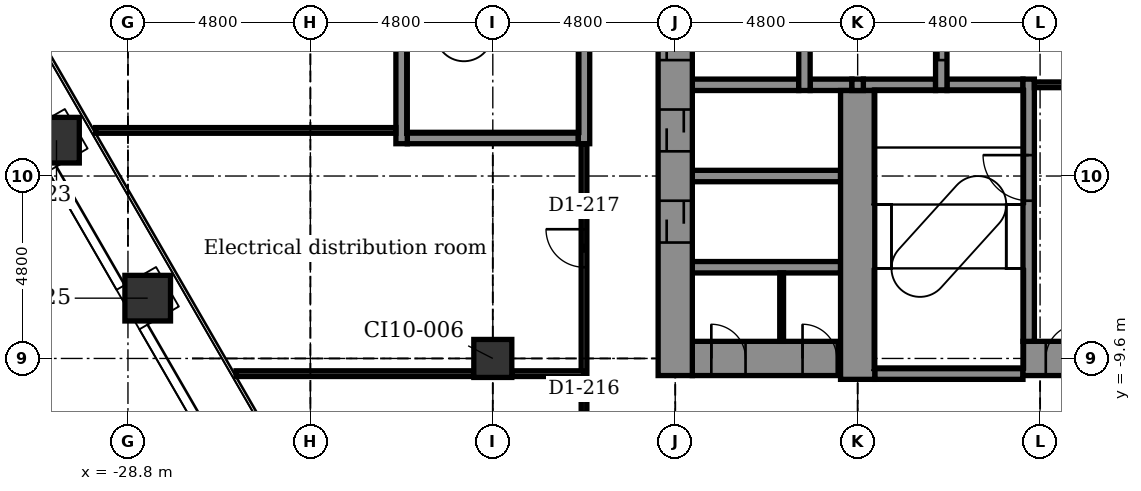
"""IFC4 building model, lengths in metres.
Left out: names, types, materials, properties, quantities, classifications, styles, units other than length and angle.
Written with IfcOpenShell. Run it as: python <this file> out.ifc"""

import sys

from ifc_helpers import new_model, si_unit, direction, frame, frame_2d, origin, origin_2d, place, context, subcontext, project, spatial, rectangle, extrude, element, fill, save


model = new_model("IFC4")
c1 = context("Model", 3, precision=1e-05, world=origin(), true_north=direction((0.0, 1.0)))
c2 = subcontext(c1, "Body", "Model", "MODEL_VIEW")
j1 = project(units=[si_unit("LENGTHUNIT", "METRE"), si_unit("PLANEANGLEUNIT", "RADIAN")], contexts=[c1])
p1 = place(None, origin())
s1 = spatial("IfcSite", under=j1, at=p1, CompositionType="ELEMENT")
p2 = place(p1, origin())
s2 = spatial("IfcBuilding", under=s1, at=p2, CompositionType="ELEMENT")
p3 = place(p2, frame((0.0, 0.0, 77.9)))
s3 = spatial("IfcBuildingStorey", under=s2, at=p3, CompositionType="ELEMENT", Elevation=77.9)
for number, where, z_axis, x_axis in (
    (1, (-28.28, -8.014, -0.2), (0.0, 0.0, 1.0), (0.866, 0.5, 0.0)),
    (2, (-30.68, -3.857, -0.2), (0.0, 0.0, 1.0), (0.866, 0.5, 0.0)),
):
    element("IfcColumn", number, at=place(p3, frame(where, z_axis=z_axis, x_axis=x_axis)), inside=s3, PredefinedType="COLUMN", context=c2, shape_type="SweptSolid", body=[
        extrude(rectangle(XDim=1.2, YDim=1.2, at=origin_2d()), origin(), (0.0, 0.0, 1.0), 4.5),
    ])
p4 = place(p3, frame((-19.2, -9.6, -0.2), z_axis=(0.0, 0.0, 1.0), x_axis=(1.0, 0.0, 0.0)))
e3 = element("IfcColumn", 3, at=p4, inside=s3, PredefinedType="COLUMN", context=c2, shape_type="SweptSolid", body=[
    extrude(rectangle(XDim=1.0, YDim=1.0, at=origin_2d()), origin(), (0.0, 0.0, 1.0), 4.5),
])
p5 = place(p3, frame((-9.15, -10.0, -0.2), z_axis=(0.0, 0.0, 1.0), x_axis=(1.0, 0.0, 0.0)))
e4 = element("IfcWall", 4, at=p5, inside=s3, PredefinedType="STANDARD", context=c2, shape_type="SweptSolid", body=[
    extrude(rectangle(XDim=3.9, YDim=0.3, at=frame_2d((1.95, 0.0))), origin(), (0.0, 0.0, 1.0), 4.5),
])
p6 = place(p3, frame((-13.95, -9.6, -0.2), z_axis=(0.0, 0.0, 1.0), x_axis=(1.0, 0.0, 0.0)))
e5 = element("IfcWall", 5, at=p6, inside=s3, PredefinedType="SHEAR", context=c2, shape_type="SweptSolid", body=[
    extrude(rectangle(XDim=3.9, YDim=0.9, at=frame_2d((1.95, 0.0))), origin(), (0.0, 0.0, 1.0), 4.5),
])
p7 = place(p6, frame((0.5, 0.0, 0.2)))
e6 = element("IfcOpeningElement", 6, at=p7, cuts=e5, PredefinedType="OPENING", context=c2, shape_type="SweptSolid", body=[
    extrude(rectangle(XDim=0.9, YDim=2.1, at=frame_2d((0.45, 1.05))), frame((0.0, 0.46, 0.0), z_axis=(0.0, -1.0, 0.0), x_axis=(1.0, 0.0, 0.0)), (0.0, 0.0, 1.0), 0.92),
])
p8 = place(p6, frame((2.9, 0.0, 0.2)))
e7 = element("IfcOpeningElement", 7, at=p8, cuts=e5, PredefinedType="OPENING", context=c2, shape_type="SweptSolid", body=[
    extrude(rectangle(XDim=0.9, YDim=2.1, at=frame_2d((0.45, 1.05))), frame((0.0, 0.46, 0.0), z_axis=(0.0, -1.0, 0.0), x_axis=(1.0, 0.0, 0.0)), (0.0, 0.0, 1.0), 0.92),
])
p9 = place(p3, frame((-5.25, -9.6, -0.2), z_axis=(0.0, 0.0, 1.0), x_axis=(1.0, 0.0, 0.0)))
e8 = element("IfcWall", 8, at=p9, inside=s3, PredefinedType="SHEAR", context=c2, shape_type="SweptSolid", body=[
    extrude(rectangle(XDim=10.2, YDim=0.9, at=frame_2d((5.1, 0.0))), origin(), (0.0, 0.0, 1.0), 4.5),
])
p10 = place(p9, frame((0.6, 0.0, 0.2)))
e9 = element("IfcOpeningElement", 9, at=p10, cuts=e8, PredefinedType="OPENING", context=c2, shape_type="SweptSolid", body=[
    extrude(rectangle(XDim=0.9, YDim=2.1, at=frame_2d((0.45, 1.05))), frame((0.0, 0.46, 0.0), z_axis=(0.0, -1.0, 0.0), x_axis=(1.0, 0.0, 0.0)), (0.0, 0.0, 1.0), 0.92),
])
for number, where, z_axis, x_axis in (
    (10, (-13.95, -7.2, -0.2), (0.0, 0.0, 1.0), (1.0, 0.0, 0.0)),
    (11, (-13.95, -4.8, -0.2), (0.0, 0.0, 1.0), (1.0, 0.0, 0.0)),
):
    element("IfcWall", number, at=place(p3, frame(where, z_axis=z_axis, x_axis=x_axis)), inside=s3, PredefinedType="STANDARD", context=c2, shape_type="SweptSolid", body=[
        extrude(rectangle(XDim=3.9, YDim=0.3, at=frame_2d((1.95, 0.0))), origin(), (0.0, 0.0, 1.0), 4.5),
    ])
p11 = place(p3, frame((-21.45, -3.8, -0.2), z_axis=(0.0, 0.0, 1.0), x_axis=(1.0, 0.0, 0.0)))
e12 = element("IfcWall", 12, at=p11, inside=s3, PredefinedType="STANDARD", context=c2, shape_type="SweptSolid", body=[
    extrude(rectangle(XDim=4.5, YDim=0.3, at=frame_2d((2.25, 0.0))), origin(), (0.0, 0.0, 1.0), 4.5),
])
p12 = place(p3, frame((-13.95, -2.4, -0.2), z_axis=(0.0, 0.0, 1.0), x_axis=(1.0, 0.0, 0.0)))
e13 = element("IfcWall", 13, at=p12, inside=s3, PredefinedType="STANDARD", context=c2, shape_type="SweptSolid", body=[
    extrude(rectangle(XDim=2.8, YDim=0.3, at=frame_2d((1.4, 0.0))), origin(), (0.0, 0.0, 1.0), 4.5),
])
p13 = place(p3, frame((-10.85, -2.4, -0.2), z_axis=(0.0, 0.0, 1.0), x_axis=(1.0, 0.0, 0.0)))
e14 = element("IfcWall", 14, at=p13, inside=s3, PredefinedType="STANDARD", context=c2, shape_type="SweptSolid", body=[
    extrude(rectangle(XDim=1.1, YDim=0.3, at=frame_2d((0.55, 0.0))), origin(), (0.0, 0.0, 1.0), 4.5),
])
p14 = place(p3, frame((-9.45, -2.4, -0.2), z_axis=(0.0, 0.0, 1.0), x_axis=(1.0, 0.0, 0.0)))
e15 = element("IfcWall", 15, at=p14, inside=s3, PredefinedType="STANDARD", context=c2, shape_type="SweptSolid", body=[
    extrude(rectangle(XDim=1.9, YDim=0.3, at=frame_2d((0.95, 0.0))), origin(), (0.0, 0.0, 1.0), 4.5),
])
p15 = place(p3, frame((-7.25, -2.4, -0.2), z_axis=(0.0, 0.0, 1.0), x_axis=(1.0, 0.0, 0.0)))
e16 = element("IfcWall", 16, at=p15, inside=s3, PredefinedType="STANDARD", context=c2, shape_type="SweptSolid", body=[
    extrude(rectangle(XDim=2.0, YDim=0.3, at=frame_2d((1.0, 0.0))), origin(), (0.0, 0.0, 1.0), 4.5),
])
p16 = place(p3, frame((-21.6, -3.95, -0.2), z_axis=(0.0, 0.0, 1.0), x_axis=(0.0, 1.0, 0.0)))
e17 = element("IfcWall", 17, at=p16, inside=s3, PredefinedType="STANDARD", context=c2, shape_type="SweptSolid", body=[
    extrude(rectangle(XDim=7.9, YDim=0.3, at=frame_2d((3.95, 0.0))), origin(), (0.0, 0.0, 1.0), 4.5),
])
p17 = place(p3, frame((-16.8, -3.95, -0.2), z_axis=(0.0, 0.0, 1.0), x_axis=(0.0, 1.0, 0.0)))
e18 = element("IfcWall", 18, at=p17, inside=s3, PredefinedType="STANDARD", context=c2, shape_type="SweptSolid", body=[
    extrude(rectangle(XDim=7.9, YDim=0.3, at=frame_2d((3.95, 0.0))), origin(), (0.0, 0.0, 1.0), 4.5),
])
p18 = place(p17, frame((6.35, 0.0, 0.2)))
e19 = element("IfcOpeningElement", 19, at=p18, cuts=e18, PredefinedType="OPENING", context=c2, shape_type="SweptSolid", body=[
    extrude(rectangle(XDim=1.2, YDim=2.1, at=frame_2d((0.6, 1.05))), frame((0.0, 0.16, 0.0), z_axis=(0.0, -1.0, 0.0), x_axis=(1.0, 0.0, 0.0)), (0.0, 0.0, 1.0), 0.32),
])
p19 = place(p3, frame((-14.4, -10.05, -0.2), z_axis=(0.0, 0.0, 1.0), x_axis=(0.0, 1.0, 0.0)))
e20 = element("IfcWall", 20, at=p19, inside=s3, PredefinedType="SHEAR", context=c2, shape_type="SweptSolid", body=[
    extrude(rectangle(XDim=20.1, YDim=0.9, at=frame_2d((10.05, 0.0))), origin(), (0.0, 0.0, 1.0), 4.5),
])
p20 = place(p19, frame((3.5, 0.0, 0.2)))
e21 = element("IfcOpeningElement", 21, at=p20, cuts=e20, PredefinedType="OPENING", context=c2, shape_type="SweptSolid", body=[
    extrude(rectangle(XDim=1.1, YDim=2.1, at=frame_2d((0.55, 1.05))), frame((0.0, 0.46, 0.0), z_axis=(0.0, -1.0, 0.0), x_axis=(1.0, 0.0, 0.0)), (0.0, 0.0, 1.0), 0.92),
])
p21 = place(p19, frame((5.9, 0.0, 0.2)))
e22 = element("IfcOpeningElement", 22, at=p21, cuts=e20, PredefinedType="OPENING", context=c2, shape_type="SweptSolid", body=[
    extrude(rectangle(XDim=1.1, YDim=2.1, at=frame_2d((0.55, 1.05))), frame((0.0, 0.46, 0.0), z_axis=(0.0, -1.0, 0.0), x_axis=(1.0, 0.0, 0.0)), (0.0, 0.0, 1.0), 0.92),
])
p22 = place(p19, frame((8.3, 0.0, 0.2)))
e23 = element("IfcOpeningElement", 23, at=p22, cuts=e20, PredefinedType="OPENING", context=c2, shape_type="SweptSolid", body=[
    extrude(rectangle(XDim=1.1, YDim=2.1, at=frame_2d((0.55, 1.05))), frame((0.0, 0.46, 0.0), z_axis=(0.0, -1.0, 0.0), x_axis=(1.0, 0.0, 0.0)), (0.0, 0.0, 1.0), 0.92),
])
p23 = place(p19, frame((10.7, 0.0, 0.2)))
e24 = element("IfcOpeningElement", 24, at=p23, cuts=e20, PredefinedType="OPENING", context=c2, shape_type="SweptSolid", body=[
    extrude(rectangle(XDim=1.1, YDim=2.1, at=frame_2d((0.55, 1.05))), frame((0.0, 0.46, 0.0), z_axis=(0.0, -1.0, 0.0), x_axis=(1.0, 0.0, 0.0)), (0.0, 0.0, 1.0), 0.92),
])
p24 = place(p3, frame((-11.0, -2.55, -0.2), z_axis=(0.0, 0.0, 1.0), x_axis=(0.0, 1.0, 0.0)))
e25 = element("IfcWall", 25, at=p24, inside=s3, PredefinedType="STANDARD", context=c2, shape_type="SweptSolid", body=[
    extrude(rectangle(XDim=5.1, YDim=0.3, at=frame_2d((2.55, 0.0))), origin(), (0.0, 0.0, 1.0), 4.5),
])
p25 = place(p3, frame((-9.6, -10.15, -0.2), z_axis=(0.0, 0.0, 1.0), x_axis=(0.0, 1.0, 0.0)))
e26 = element("IfcWall", 26, at=p25, inside=s3, PredefinedType="SHEAR", context=c2, shape_type="SweptSolid", body=[
    extrude(rectangle(XDim=7.6, YDim=0.9, at=frame_2d((3.8, 0.0))), origin(), (0.0, 0.0, 1.0), 4.5),
])
p26 = place(p3, frame((-9.6, -2.55, -0.2), z_axis=(0.0, 0.0, 1.0), x_axis=(0.0, 1.0, 0.0)))
e27 = element("IfcWall", 27, at=p26, inside=s3, PredefinedType="STANDARD", context=c2, shape_type="SweptSolid", body=[
    extrude(rectangle(XDim=0.3, YDim=0.3, at=frame_2d((0.15, 0.0))), origin(), (0.0, 0.0, 1.0), 4.5),
])
p27 = place(p3, frame((-7.4, -2.55, -0.2), z_axis=(0.0, 0.0, 1.0), x_axis=(0.0, 1.0, 0.0)))
e28 = element("IfcWall", 28, at=p27, inside=s3, PredefinedType="STANDARD", context=c2, shape_type="SweptSolid", body=[
    extrude(rectangle(XDim=5.1, YDim=0.3, at=frame_2d((2.55, 0.0))), origin(), (0.0, 0.0, 1.0), 4.5),
])
p28 = place(p27, frame((0.8, 0.0, 0.2)))
e29 = element("IfcOpeningElement", 29, at=p28, cuts=e28, PredefinedType="OPENING", context=c2, shape_type="SweptSolid", body=[
    extrude(rectangle(XDim=1.1, YDim=2.1, at=frame_2d((0.55, 1.05))), frame((0.0, 0.16, 0.0), z_axis=(0.0, -1.0, 0.0), x_axis=(1.0, 0.0, 0.0)), (0.0, 0.0, 1.0), 0.32),
])
p29 = place(p27, frame((3.2, 0.0, 0.2)))
e30 = element("IfcOpeningElement", 30, at=p29, cuts=e28, PredefinedType="OPENING", context=c2, shape_type="SweptSolid", body=[
    extrude(rectangle(XDim=1.1, YDim=2.1, at=frame_2d((0.55, 1.05))), frame((0.0, 0.16, 0.0), z_axis=(0.0, -1.0, 0.0), x_axis=(1.0, 0.0, 0.0)), (0.0, 0.0, 1.0), 0.32),
])
p30 = place(p3, frame((-5.1, -9.15, -0.2), z_axis=(0.0, 0.0, 1.0), x_axis=(0.0, 1.0, 0.0)))
e31 = element("IfcWall", 31, at=p30, inside=s3, PredefinedType="STANDARD", context=c2, shape_type="SweptSolid", body=[
    extrude(rectangle(XDim=6.9, YDim=0.3, at=frame_2d((3.45, 0.0))), origin(), (0.0, 0.0, 1.0), 4.5),
])
p31 = place(p30, frame((3.7, 0.0, 0.2)))
e32 = element("IfcOpeningElement", 32, at=p31, cuts=e31, PredefinedType="OPENING", context=c2, shape_type="SweptSolid", body=[
    extrude(rectangle(XDim=1.2, YDim=2.1, at=frame_2d((0.6, 1.05))), frame((0.0, 0.16, 0.0), z_axis=(0.0, -1.0, 0.0), x_axis=(1.0, 0.0, 0.0)), (0.0, 0.0, 1.0), 0.32),
])
p32 = place(p3, frame((-11.6, -9.15, 0.0), z_axis=(0.0, 0.0, 1.0), x_axis=(0.0, 1.0, 0.0)))
e33 = element("IfcWall", 33, at=p32, inside=s3, PredefinedType="PARTITIONING", context=c2, shape_type="SweptSolid", body=[
    extrude(rectangle(XDim=1.8, YDim=0.1, at=frame_2d((0.9, 0.0))), origin(), (0.0, 0.0, 1.0), 4.3),
])
p33 = place(p3, frame((-16.8, -13.0, 0.0), z_axis=(0.0, 0.0, 1.0), x_axis=(0.0, 1.0, 0.0)))
e34 = element("IfcWall", 34, at=p33, inside=s3, PredefinedType="PARTITIONING", context=c2, shape_type="SweptSolid", body=[
    extrude(rectangle(XDim=9.05, YDim=0.15, at=frame_2d((4.525, 0.0))), origin(), (0.0, 0.0, 1.0), 4.3),
])
p34 = place(p33, frame((1.0, 0.0, 0.0)))
e35 = element("IfcOpeningElement", 35, at=p34, cuts=e34, PredefinedType="OPENING", context=c2, shape_type="SweptSolid", body=[
    extrude(rectangle(XDim=1.0, YDim=2.1, at=frame_2d((0.5, 1.05))), frame((0.0, 0.085, 0.0), z_axis=(0.0, -1.0, 0.0), x_axis=(1.0, 0.0, 0.0)), (0.0, 0.0, 1.0), 0.17),
])
p35 = place(p33, frame((5.8, 0.0, 0.0)))
e36 = element("IfcOpeningElement", 36, at=p35, cuts=e34, PredefinedType="OPENING", context=c2, shape_type="SweptSolid", body=[
    extrude(rectangle(XDim=1.0, YDim=2.1, at=frame_2d((0.5, 1.05))), frame((0.0, 0.085, 0.0), z_axis=(0.0, -1.0, 0.0), x_axis=(1.0, 0.0, 0.0)), (0.0, 0.0, 1.0), 0.17),
])
p36 = place(p3, frame((-25.956, -10.0, 0.0), z_axis=(0.0, 0.0, 1.0), x_axis=(1.0, 0.0, 0.0)))
e37 = element("IfcWall", 37, at=p36, inside=s3, PredefinedType="PARTITIONING", context=c2, shape_type="SweptSolid", body=[
    extrude(rectangle(XDim=6.256, YDim=0.15, at=frame_2d((3.128, 0.0))), origin(), (0.0, 0.0, 1.0), 4.3),
])
p37 = place(p3, frame((-18.7, -10.0, 0.0), z_axis=(0.0, 0.0, 1.0), x_axis=(1.0, 0.0, 0.0)))
e38 = element("IfcWall", 38, at=p37, inside=s3, PredefinedType="PARTITIONING", context=c2, shape_type="SweptSolid", body=[
    extrude(rectangle(XDim=1.9, YDim=0.15, at=frame_2d((0.95, 0.0))), origin(), (0.0, 0.0, 1.0), 4.3),
])
p38 = place(p3, frame((-29.651, -3.6, 0.0), z_axis=(0.0, 0.0, 1.0), x_axis=(1.0, 0.0, 0.0)))
e39 = element("IfcWall", 39, at=p38, inside=s3, PredefinedType="PARTITIONING", context=c2, shape_type="SweptSolid", body=[
    extrude(rectangle(XDim=7.901, YDim=0.15, at=frame_2d((3.95, 0.0))), origin(), (0.0, 0.0, 1.0), 4.3),
])
p39 = place(p3, frame((-4.95, -2.4, 0.0), z_axis=(0.0, 0.0, 1.0), x_axis=(1.0, 0.0, 0.0)))
e40 = element("IfcWall", 40, at=p39, inside=s3, PredefinedType="PARTITIONING", context=c2, shape_type="SweptSolid", body=[
    extrude(rectangle(XDim=1.2, YDim=0.15, at=frame_2d((0.6, 0.0))), origin(), (0.0, 0.0, 1.0), 4.3),
])
p40 = place(p35, origin())
e41 = element("IfcDoor", 41, at=p40, inside=s3, OperationType="SINGLE_SWING_RIGHT", PredefinedType="DOOR", context=c2, shape_type="SweptSolid", body=[
    extrude(rectangle(XDim=1.0, YDim=2.1, at=frame_2d((0.5, 1.05))), frame((0.0, 0.025, 0.0), z_axis=(0.0, -1.0, 0.0), x_axis=(1.0, 0.0, 0.0)), (0.0, 0.0, 1.0), 0.05),
])
fill(e36, e41)
p41 = place(p28, origin())
e42 = element("IfcDoor", 42, at=p41, inside=s3, OperationType="DOUBLE_DOOR_SLIDING", PredefinedType="DOOR", context=c2, shape_type="SweptSolid", body=[
    extrude(rectangle(XDim=1.1, YDim=2.1, at=frame_2d((0.55, 1.05))), frame((0.0, 0.025, 0.0), z_axis=(0.0, -1.0, 0.0), x_axis=(1.0, 0.0, 0.0)), (0.0, 0.0, 1.0), 0.05),
])
fill(e29, e42)
p42 = place(p20, origin())
e43 = element("IfcDoor", 43, at=p42, inside=s3, OperationType="DOUBLE_DOOR_SLIDING", PredefinedType="DOOR", context=c2, shape_type="SweptSolid", body=[
    extrude(rectangle(XDim=1.1, YDim=2.1, at=frame_2d((0.55, 1.05))), frame((0.0, 0.025, 0.0), z_axis=(0.0, -1.0, 0.0), x_axis=(1.0, 0.0, 0.0)), (0.0, 0.0, 1.0), 0.05),
])
fill(e21, e43)
p43 = place(p21, origin())
e44 = element("IfcDoor", 44, at=p43, inside=s3, OperationType="DOUBLE_DOOR_SLIDING", PredefinedType="DOOR", context=c2, shape_type="SweptSolid", body=[
    extrude(rectangle(XDim=1.1, YDim=2.1, at=frame_2d((0.55, 1.05))), frame((0.0, 0.025, 0.0), z_axis=(0.0, -1.0, 0.0), x_axis=(1.0, 0.0, 0.0)), (0.0, 0.0, 1.0), 0.05),
])
fill(e22, e44)
p44 = place(p22, origin())
e45 = element("IfcDoor", 45, at=p44, inside=s3, OperationType="DOUBLE_DOOR_SLIDING", PredefinedType="DOOR", context=c2, shape_type="SweptSolid", body=[
    extrude(rectangle(XDim=1.1, YDim=2.1, at=frame_2d((0.55, 1.05))), frame((0.0, 0.025, 0.0), z_axis=(0.0, -1.0, 0.0), x_axis=(1.0, 0.0, 0.0)), (0.0, 0.0, 1.0), 0.05),
])
fill(e23, e45)
p45 = place(p31, origin())
e46 = element("IfcDoor", 46, at=p45, inside=s3, OperationType="SINGLE_SWING_RIGHT", PredefinedType="DOOR", context=c2, shape_type="SweptSolid", body=[
    extrude(rectangle(XDim=1.2, YDim=2.1, at=frame_2d((0.6, 1.05))), frame((0.0, 0.025, 0.0), z_axis=(0.0, -1.0, 0.0), x_axis=(1.0, 0.0, 0.0)), (0.0, 0.0, 1.0), 0.05),
])
fill(e32, e46)
p46 = place(p7, origin())
e47 = element("IfcDoor", 47, at=p46, inside=s3, OperationType="SINGLE_SWING_LEFT", PredefinedType="DOOR", context=c2, shape_type="SweptSolid", body=[
    extrude(rectangle(XDim=0.9, YDim=2.1, at=frame_2d((0.45, 1.05))), frame((0.0, 0.025, 0.0), z_axis=(0.0, -1.0, 0.0), x_axis=(1.0, 0.0, 0.0)), (0.0, 0.0, 1.0), 0.05),
])
fill(e6, e47)
p47 = place(p8, origin())
e48 = element("IfcDoor", 48, at=p47, inside=s3, OperationType="SINGLE_SWING_LEFT", PredefinedType="DOOR", context=c2, shape_type="SweptSolid", body=[
    extrude(rectangle(XDim=0.9, YDim=2.1, at=frame_2d((0.45, 1.05))), frame((0.0, 0.025, 0.0), z_axis=(0.0, -1.0, 0.0), x_axis=(1.0, 0.0, 0.0)), (0.0, 0.0, 1.0), 0.05),
])
fill(e7, e48)
p48 = place(p10, origin())
e49 = element("IfcDoor", 49, at=p48, inside=s3, OperationType="SINGLE_SWING_RIGHT", PredefinedType="DOOR", context=c2, shape_type="SweptSolid", body=[
    extrude(rectangle(XDim=0.9, YDim=2.1, at=frame_2d((0.45, 1.05))), frame((0.0, 0.025, 0.0), z_axis=(0.0, -1.0, 0.0), x_axis=(1.0, 0.0, 0.0)), (0.0, 0.0, 1.0), 0.05),
])
fill(e9, e49)
save(model, sys.argv[1])
